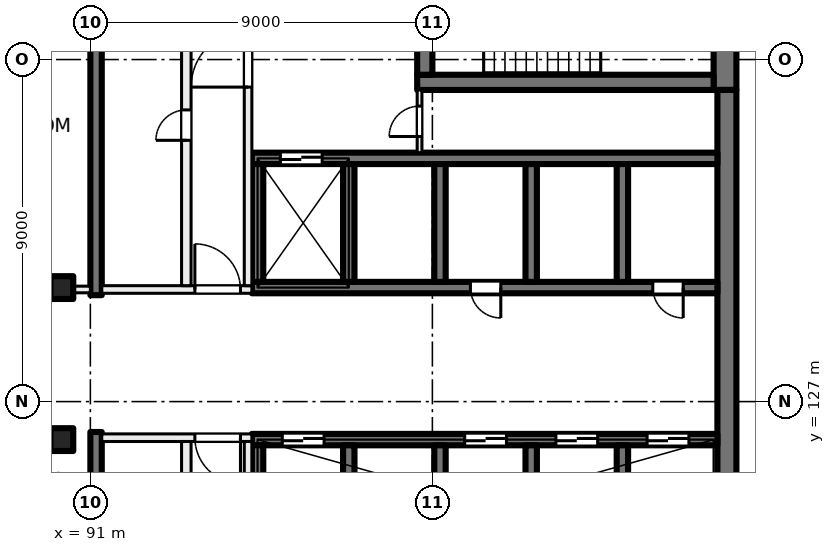
"""IFC4 building model, lengths in metres.
Left out: names, types, materials, properties, quantities, classifications, styles, units other than length and angle.
Written with IfcOpenShell. Run it as: python <this file> out.ifc"""

import sys

from ifc_helpers import new_model, si_unit, direction, frame, frame_2d, origin, origin_2d, place, context, subcontext, project, spatial, rectangle, extrude, element, fill, save


model = new_model("IFC4")
c1 = context("Model", 3, precision=1e-05, world=origin(), true_north=direction((0.0, 1.0)))
c2 = subcontext(c1, "Body", "Model", "MODEL_VIEW")
j1 = project(units=[si_unit("LENGTHUNIT", "METRE"), si_unit("PLANEANGLEUNIT", "RADIAN")], contexts=[c1])
p1 = place(None, origin())
s1 = spatial("IfcSite", under=j1, at=p1, CompositionType="ELEMENT")
p2 = place(p1, origin())
s2 = spatial("IfcBuilding", under=s1, at=p2, CompositionType="ELEMENT")
p3 = place(p2, frame((0.0, 0.0, 192.0)))
s3 = spatial("IfcBuildingStorey", under=s2, at=p3, CompositionType="ELEMENT", Elevation=192.0)
for number, where, z_axis, x_axis in (
    (1, (90.25, 130.0, 0.0), (0.0, 0.0, 1.0), (1.0, 0.0, 0.0)),
    (2, (90.25, 126.0, 0.0), (0.0, 0.0, 1.0), (1.0, 0.0, 0.0)),
):
    element("IfcColumn", number, at=place(p3, frame(where, z_axis=z_axis, x_axis=x_axis)), inside=s3, PredefinedType="COLUMN", context=c2, shape_type="SweptSolid", body=[
        extrude(rectangle(XDim=0.6, YDim=0.6, at=origin_2d()), origin(), (0.0, 0.0, 1.0), 4.0),
    ])
p4 = place(p3, frame((107.7, 139.0, 0.0), z_axis=(0.0, 0.0, 1.0), x_axis=(0.0, -1.0, 0.0)))
e3 = element("IfcWall", 3, at=p4, inside=s3, PredefinedType="SHEAR", context=c2, shape_type="SweptSolid", body=[
    extrude(rectangle(XDim=3.8, YDim=0.6, at=frame_2d((1.9, 0.0))), origin(), (0.0, 0.0, 1.0), 4.0),
])
p5 = place(p3, frame((107.75, 135.2, 0.0), z_axis=(0.0, 0.0, 1.0), x_axis=(0.0, -1.0, 0.0)))
e4 = element("IfcWall", 4, at=p5, inside=s3, PredefinedType="SHEAR", context=c2, shape_type="SweptSolid", body=[
    extrude(rectangle(XDim=14.4, YDim=0.5, at=frame_2d((7.2, 0.0))), origin(), (0.0, 0.0, 1.0), 4.0),
])
p6 = place(p3, frame((107.4, 135.4, 0.0), z_axis=(0.0, 0.0, 1.0), x_axis=(-1.0, 0.0, 0.0)))
e5 = element("IfcWall", 5, at=p6, inside=s3, PredefinedType="SHEAR", context=c2, shape_type="SweptSolid", body=[
    extrude(rectangle(XDim=7.8, YDim=0.4, at=frame_2d((3.9, 0.0))), origin(), (0.0, 0.0, 1.0), 4.0),
])
p7 = place(p3, frame((99.8, 138.4, 0.0), z_axis=(0.0, 0.0, 1.0), x_axis=(0.0, -1.0, 0.0)))
e6 = element("IfcWall", 6, at=p7, inside=s3, PredefinedType="SHEAR", context=c2, shape_type="SweptSolid", body=[
    extrude(rectangle(XDim=2.8, YDim=0.4, at=frame_2d((1.4, 0.0))), origin(), (0.0, 0.0, 1.0), 4.0),
])
p8 = place(p7, frame((0.85, 0.0, 0.0)))
e7 = element("IfcOpeningElement", 7, at=p8, cuts=e6, PredefinedType="OPENING", context=c2, shape_type="SweptSolid", body=[
    extrude(rectangle(XDim=1.0, YDim=2.1, at=frame_2d((0.5, 1.05))), frame((0.0, 0.21, 0.0), z_axis=(0.0, -1.0, 0.0), x_axis=(1.0, 0.0, 0.0)), (0.0, 0.0, 1.0), 0.42),
])
p9 = place(p3, frame((107.5, 130.0, 0.0), z_axis=(0.0, 0.0, 1.0), x_axis=(-1.0, 0.0, 0.0)))
e8 = element("IfcWall", 8, at=p9, inside=s3, PredefinedType="SHEAR", context=c2, shape_type="SweptSolid", body=[
    extrude(rectangle(XDim=12.25, YDim=0.3, at=frame_2d((6.125, 0.0))), origin(), (0.0, 0.0, 1.0), 4.0),
])
p10 = place(p9, frame((0.9, 0.0, 0.0)))
e9 = element("IfcOpeningElement", 9, at=p10, cuts=e8, PredefinedType="OPENING", context=c2, shape_type="SweptSolid", body=[
    extrude(rectangle(XDim=0.8, YDim=2.1, at=frame_2d((0.4, 1.05))), frame((0.0, 0.16, 0.0), z_axis=(0.0, -1.0, 0.0), x_axis=(1.0, 0.0, 0.0)), (0.0, 0.0, 1.0), 0.32),
])
p11 = place(p9, frame((5.7, 0.0, 0.0)))
e10 = element("IfcOpeningElement", 10, at=p11, cuts=e8, PredefinedType="OPENING", context=c2, shape_type="SweptSolid", body=[
    extrude(rectangle(XDim=0.8, YDim=2.1, at=frame_2d((0.4, 1.05))), frame((0.0, 0.16, 0.0), z_axis=(0.0, -1.0, 0.0), x_axis=(1.0, 0.0, 0.0)), (0.0, 0.0, 1.0), 0.32),
])
p12 = place(p3, frame((107.5, 133.4, 0.0), z_axis=(0.0, 0.0, 1.0), x_axis=(-1.0, 0.0, 0.0)))
e11 = element("IfcWall", 11, at=p12, inside=s3, PredefinedType="SHEAR", context=c2, shape_type="SweptSolid", body=[
    extrude(rectangle(XDim=12.25, YDim=0.3, at=frame_2d((6.125, 0.0))), origin(), (0.0, 0.0, 1.0), 4.0),
])
p13 = place(p12, frame((10.4, 0.0, 0.0)))
e12 = element("IfcOpeningElement", 12, at=p13, cuts=e11, PredefinedType="OPENING", context=c2, shape_type="SweptSolid", body=[
    extrude(rectangle(XDim=1.1, YDim=2.1, at=frame_2d((0.55, 1.05))), frame((0.0, 0.16, 0.0), z_axis=(0.0, -1.0, 0.0), x_axis=(1.0, 0.0, 0.0)), (0.0, 0.0, 1.0), 0.32),
])
for number, where, z_axis, x_axis in (
    (13, (105.0, 133.25, 0.0), (0.0, 0.0, 1.0), (0.0, -1.0, 0.0)),
    (14, (102.6, 133.25, 0.0), (0.0, 0.0, 1.0), (0.0, -1.0, 0.0)),
    (15, (100.2, 133.25, 0.0), (0.0, 0.0, 1.0), (0.0, -1.0, 0.0)),
    (16, (97.8, 133.25, 0.0), (0.0, 0.0, 1.0), (0.0, -1.0, 0.0)),
    (17, (95.4, 133.25, 0.0), (0.0, 0.0, 1.0), (0.0, -1.0, 0.0)),
):
    element("IfcWall", number, at=place(p3, frame(where, z_axis=z_axis, x_axis=x_axis)), inside=s3, PredefinedType="SHEAR", context=c2, shape_type="SweptSolid", body=[
        extrude(rectangle(XDim=3.1, YDim=0.3, at=frame_2d((1.55, 0.0))), origin(), (0.0, 0.0, 1.0), 4.0),
    ])
p14 = place(p3, frame((107.5, 126.0, 0.0), z_axis=(0.0, 0.0, 1.0), x_axis=(-1.0, 0.0, 0.0)))
e18 = element("IfcWall", 18, at=p14, inside=s3, PredefinedType="SHEAR", context=c2, shape_type="SweptSolid", body=[
    extrude(rectangle(XDim=12.25, YDim=0.3, at=frame_2d((6.125, 0.0))), origin(), (0.0, 0.0, 1.0), 4.0),
])
p15 = place(p14, frame((0.75, 0.0, 0.0)))
e19 = element("IfcOpeningElement", 19, at=p15, cuts=e18, PredefinedType="OPENING", context=c2, shape_type="SweptSolid", body=[
    extrude(rectangle(XDim=1.1, YDim=2.1, at=frame_2d((0.55, 1.05))), frame((0.0, 0.16, 0.0), z_axis=(0.0, -1.0, 0.0), x_axis=(1.0, 0.0, 0.0)), (0.0, 0.0, 1.0), 0.32),
])
p16 = place(p14, frame((3.15, 0.0, 0.0)))
e20 = element("IfcOpeningElement", 20, at=p16, cuts=e18, PredefinedType="OPENING", context=c2, shape_type="SweptSolid", body=[
    extrude(rectangle(XDim=1.1, YDim=2.1, at=frame_2d((0.55, 1.05))), frame((0.0, 0.16, 0.0), z_axis=(0.0, -1.0, 0.0), x_axis=(1.0, 0.0, 0.0)), (0.0, 0.0, 1.0), 0.32),
])
p17 = place(p14, frame((5.55, 0.0, 0.0)))
e21 = element("IfcOpeningElement", 21, at=p17, cuts=e18, PredefinedType="OPENING", context=c2, shape_type="SweptSolid", body=[
    extrude(rectangle(XDim=1.1, YDim=2.1, at=frame_2d((0.55, 1.05))), frame((0.0, 0.16, 0.0), z_axis=(0.0, -1.0, 0.0), x_axis=(1.0, 0.0, 0.0)), (0.0, 0.0, 1.0), 0.32),
])
p18 = place(p14, frame((10.35, 0.0, 0.0)))
e22 = element("IfcOpeningElement", 22, at=p18, cuts=e18, PredefinedType="OPENING", context=c2, shape_type="SweptSolid", body=[
    extrude(rectangle(XDim=1.1, YDim=2.1, at=frame_2d((0.55, 1.05))), frame((0.0, 0.16, 0.0), z_axis=(0.0, -1.0, 0.0), x_axis=(1.0, 0.0, 0.0)), (0.0, 0.0, 1.0), 0.32),
])
for number, where, z_axis, x_axis in (
    (23, (105.0, 125.85, 0.0), (0.0, 0.0, 1.0), (0.0, -1.0, 0.0)),
    (24, (102.6, 125.85, 0.0), (0.0, 0.0, 1.0), (0.0, -1.0, 0.0)),
    (25, (100.2, 125.85, 0.0), (0.0, 0.0, 1.0), (0.0, -1.0, 0.0)),
    (26, (97.8, 125.85, 0.0), (0.0, 0.0, 1.0), (0.0, -1.0, 0.0)),
    (27, (95.4, 125.85, 0.0), (0.0, 0.0, 1.0), (0.0, -1.0, 0.0)),
):
    element("IfcWall", number, at=place(p3, frame(where, z_axis=z_axis, x_axis=x_axis)), inside=s3, PredefinedType="SHEAR", context=c2, shape_type="SweptSolid", body=[
        extrude(rectangle(XDim=3.1, YDim=0.3, at=frame_2d((1.55, 0.0))), origin(), (0.0, 0.0, 1.0), 4.0),
    ])
for number, where, z_axis, x_axis in (
    (28, (91.15, 138.5, 0.0), (0.0, 0.0, 1.0), (0.0, -1.0, 0.0)),
    (29, (91.15, 126.2, 0.0), (0.0, 0.0, 1.0), (0.0, -1.0, 0.0)),
):
    element("IfcWall", number, at=place(p3, frame(where, z_axis=z_axis, x_axis=x_axis)), inside=s3, PredefinedType="SHEAR", context=c2, shape_type="SweptSolid", body=[
        extrude(rectangle(XDim=8.7, YDim=0.3, at=frame_2d((4.35, 0.0))), origin(), (0.0, 0.0, 1.0), 4.0),
    ])
p19 = place(p3, frame((95.25, 126.05, 0.0), z_axis=(0.0, 0.0, 1.0), x_axis=(-1.0, 0.0, 0.0)))
e30 = element("IfcWall", 30, at=p19, inside=s3, PredefinedType="PARTITIONING", context=c2, shape_type="SweptSolid", body=[
    extrude(rectangle(XDim=3.95, YDim=0.2, at=frame_2d((1.975, 0.0))), origin(), (0.0, 0.0, 1.0), 3.625),
])
p20 = place(p19, frame((0.3, 0.0, 0.0)))
e31 = element("IfcOpeningElement", 31, at=p20, cuts=e30, PredefinedType="OPENING", context=c2, shape_type="SweptSolid", body=[
    extrude(rectangle(XDim=1.2, YDim=2.1, at=frame_2d((0.6, 1.05))), frame((0.0, 0.11, 0.0), z_axis=(0.0, -1.0, 0.0), x_axis=(1.0, 0.0, 0.0)), (0.0, 0.0, 1.0), 0.22),
])
p21 = place(p3, frame((95.15, 117.5, 0.0), z_axis=(0.0, 0.0, 1.0), x_axis=(0.0, 1.0, 0.0)))
e32 = element("IfcWall", 32, at=p21, inside=s3, PredefinedType="PARTITIONING", context=c2, shape_type="SweptSolid", body=[
    extrude(rectangle(XDim=8.45, YDim=0.2, at=frame_2d((4.225, 0.0))), origin(), (0.0, 0.0, 1.0), 3.625),
])
p22 = place(p21, frame((1.725, 0.0, 0.0)))
e33 = element("IfcOpeningElement", 33, at=p22, cuts=e32, PredefinedType="OPENING", context=c2, shape_type="SweptSolid", body=[
    extrude(rectangle(XDim=1.5, YDim=2.1, at=frame_2d((0.75, 1.05))), frame((0.0, 0.11, 0.0), z_axis=(0.0, -1.0, 0.0), x_axis=(1.0, 0.0, 0.0)), (0.0, 0.0, 1.0), 0.22),
])
p23 = place(p3, frame((93.525, 117.5, 0.0), z_axis=(0.0, 0.0, 1.0), x_axis=(0.0, 1.0, 0.0)))
e34 = element("IfcWall", 34, at=p23, inside=s3, PredefinedType="PARTITIONING", context=c2, shape_type="SweptSolid", body=[
    extrude(rectangle(XDim=8.45, YDim=0.25, at=frame_2d((4.225, 0.0))), origin(), (0.0, 0.0, 1.0), 3.625),
])
p24 = place(p23, frame((5.26, 0.0, 0.0)))
e35 = element("IfcOpeningElement", 35, at=p24, cuts=e34, PredefinedType="OPENING", context=c2, shape_type="SweptSolid", body=[
    extrude(rectangle(XDim=0.8, YDim=2.1, at=frame_2d((0.4, 1.05))), frame((0.0, 0.135, 0.0), z_axis=(0.0, -1.0, 0.0), x_axis=(1.0, 0.0, 0.0)), (0.0, 0.0, 1.0), 0.27),
])
p25 = place(p23, frame((0.985, 0.0, 0.0)))
e36 = element("IfcOpeningElement", 36, at=p25, cuts=e34, PredefinedType="OPENING", context=c2, shape_type="SweptSolid", body=[
    extrude(rectangle(XDim=0.8, YDim=2.1, at=frame_2d((0.4, 1.05))), frame((0.0, 0.135, 0.0), z_axis=(0.0, -1.0, 0.0), x_axis=(1.0, 0.0, 0.0)), (0.0, 0.0, 1.0), 0.27),
])
p26 = place(p3, frame((91.3, 129.95, 0.0), z_axis=(0.0, 0.0, 1.0), x_axis=(1.0, 0.0, 0.0)))
e37 = element("IfcWall", 37, at=p26, inside=s3, PredefinedType="PARTITIONING", context=c2, shape_type="SweptSolid", body=[
    extrude(rectangle(XDim=3.95, YDim=0.2, at=frame_2d((1.975, 0.0))), origin(), (0.0, 0.0, 1.0), 3.625),
])
p27 = place(p26, frame((2.45, 0.0, 0.0)))
e38 = element("IfcOpeningElement", 38, at=p27, cuts=e37, PredefinedType="OPENING", context=c2, shape_type="SweptSolid", body=[
    extrude(rectangle(XDim=1.2, YDim=2.1, at=frame_2d((0.6, 1.05))), frame((0.0, 0.11, 0.0), z_axis=(0.0, -1.0, 0.0), x_axis=(1.0, 0.0, 0.0)), (0.0, 0.0, 1.0), 0.22),
])
p28 = place(p3, frame((95.15, 130.05, 0.0), z_axis=(0.0, 0.0, 1.0), x_axis=(0.0, 1.0, 0.0)))
e39 = element("IfcWall", 39, at=p28, inside=s3, PredefinedType="PARTITIONING", context=c2, shape_type="SweptSolid", body=[
    extrude(rectangle(XDim=8.45, YDim=0.2, at=frame_2d((4.225, 0.0))), origin(), (0.0, 0.0, 1.0), 3.625),
])
p29 = place(p28, frame((5.225, 0.0, 0.0)))
e40 = element("IfcOpeningElement", 40, at=p29, cuts=e39, PredefinedType="OPENING", context=c2, shape_type="SweptSolid", body=[
    extrude(rectangle(XDim=1.5, YDim=2.1, at=frame_2d((0.75, 1.05))), frame((0.0, 0.11, 0.0), z_axis=(0.0, -1.0, 0.0), x_axis=(1.0, 0.0, 0.0)), (0.0, 0.0, 1.0), 0.22),
])
p30 = place(p3, frame((93.525, 130.05, 0.0), z_axis=(0.0, 0.0, 1.0), x_axis=(0.0, 1.0, 0.0)))
e41 = element("IfcWall", 41, at=p30, inside=s3, PredefinedType="PARTITIONING", context=c2, shape_type="SweptSolid", body=[
    extrude(rectangle(XDim=8.45, YDim=0.25, at=frame_2d((4.225, 0.0))), origin(), (0.0, 0.0, 1.0), 3.625),
])
p31 = place(p30, frame((3.825, 0.0, 0.0)))
e42 = element("IfcOpeningElement", 42, at=p31, cuts=e41, PredefinedType="OPENING", context=c2, shape_type="SweptSolid", body=[
    extrude(rectangle(XDim=0.8, YDim=2.1, at=frame_2d((0.4, 1.05))), frame((0.0, 0.135, 0.0), z_axis=(0.0, -1.0, 0.0), x_axis=(1.0, 0.0, 0.0)), (0.0, 0.0, 1.0), 0.27),
])
p32 = place(p3, frame((99.663, 133.55, 0.0), z_axis=(0.0, 0.0, 1.0), x_axis=(0.0, 1.0, 0.0)))
e43 = element("IfcWall", 43, at=p32, inside=s3, PredefinedType="PARTITIONING", context=c2, shape_type="SweptSolid", body=[
    extrude(rectangle(XDim=1.65, YDim=0.125, at=frame_2d((0.825, 0.0))), origin(), (0.0, 0.0, 1.0), 3.625),
])
p33 = place(p32, frame((0.425, 0.0, 0.0)))
e44 = element("IfcOpeningElement", 44, at=p33, cuts=e43, PredefinedType="OPENING", context=c2, shape_type="SweptSolid", body=[
    extrude(rectangle(XDim=0.8, YDim=2.1, at=frame_2d((0.4, 1.05))), frame((0.0, 0.073, 0.0), z_axis=(0.0, -1.0, 0.0), x_axis=(1.0, 0.0, 0.0)), (0.0, 0.0, 1.0), 0.145),
])
p34 = place(p3, frame((85.838, 129.95, 0.0), z_axis=(0.0, 0.0, 1.0), x_axis=(1.0, 0.0, 0.0)))
e45 = element("IfcWall", 45, at=p34, inside=s3, PredefinedType="PARTITIONING", context=c2, shape_type="SweptSolid", body=[
    extrude(rectangle(XDim=5.162, YDim=0.175, at=frame_2d((2.581, 0.0))), origin(), (0.0, 0.0, 1.0), 3.625),
])
p35 = place(p34, frame((1.971, 0.0, 0.0)))
e46 = element("IfcOpeningElement", 46, at=p35, cuts=e45, PredefinedType="OPENING", context=c2, shape_type="SweptSolid", body=[
    extrude(rectangle(XDim=1.2, YDim=2.1, at=frame_2d((0.6, 1.05))), frame((0.0, 0.097, 0.0), z_axis=(0.0, -1.0, 0.0), x_axis=(1.0, 0.0, 0.0)), (0.0, 0.0, 1.0), 0.195),
])
p36 = place(p15, origin())
e47 = element("IfcDoor", 47, at=p36, inside=s3, OperationType="DOUBLE_DOOR_SLIDING", PredefinedType="DOOR", context=c2, shape_type="SweptSolid", body=[
    extrude(rectangle(XDim=1.1, YDim=2.1, at=frame_2d((0.55, 1.05))), frame((0.0, 0.025, 0.0), z_axis=(0.0, -1.0, 0.0), x_axis=(1.0, 0.0, 0.0)), (0.0, 0.0, 1.0), 0.05),
])
fill(e19, e47)
p37 = place(p16, origin())
e48 = element("IfcDoor", 48, at=p37, inside=s3, OperationType="DOUBLE_DOOR_SLIDING", PredefinedType="DOOR", context=c2, shape_type="SweptSolid", body=[
    extrude(rectangle(XDim=1.1, YDim=2.1, at=frame_2d((0.55, 1.05))), frame((0.0, 0.025, 0.0), z_axis=(0.0, -1.0, 0.0), x_axis=(1.0, 0.0, 0.0)), (0.0, 0.0, 1.0), 0.05),
])
fill(e20, e48)
p38 = place(p17, origin())
e49 = element("IfcDoor", 49, at=p38, inside=s3, OperationType="DOUBLE_DOOR_SLIDING", PredefinedType="DOOR", context=c2, shape_type="SweptSolid", body=[
    extrude(rectangle(XDim=1.1, YDim=2.1, at=frame_2d((0.55, 1.05))), frame((0.0, 0.025, 0.0), z_axis=(0.0, -1.0, 0.0), x_axis=(1.0, 0.0, 0.0)), (0.0, 0.0, 1.0), 0.05),
])
fill(e21, e49)
p39 = place(p18, origin())
e50 = element("IfcDoor", 50, at=p39, inside=s3, OperationType="DOUBLE_DOOR_SLIDING", PredefinedType="DOOR", context=c2, shape_type="SweptSolid", body=[
    extrude(rectangle(XDim=1.1, YDim=2.1, at=frame_2d((0.55, 1.05))), frame((0.0, 0.025, 0.0), z_axis=(0.0, -1.0, 0.0), x_axis=(1.0, 0.0, 0.0)), (0.0, 0.0, 1.0), 0.05),
])
fill(e22, e50)
p40 = place(p10, origin())
e51 = element("IfcDoor", 51, at=p40, inside=s3, OperationType="SINGLE_SWING_LEFT", PredefinedType="DOOR", context=c2, shape_type="SweptSolid", body=[
    extrude(rectangle(XDim=0.8, YDim=2.1, at=frame_2d((0.4, 1.05))), frame((0.0, 0.025, 0.0), z_axis=(0.0, -1.0, 0.0), x_axis=(1.0, 0.0, 0.0)), (0.0, 0.0, 1.0), 0.05),
])
fill(e9, e51)
p41 = place(p11, origin())
e52 = element("IfcDoor", 52, at=p41, inside=s3, OperationType="SINGLE_SWING_RIGHT", PredefinedType="DOOR", context=c2, shape_type="SweptSolid", body=[
    extrude(rectangle(XDim=0.8, YDim=2.1, at=frame_2d((0.4, 1.05))), frame((0.0, 0.025, 0.0), z_axis=(0.0, -1.0, 0.0), x_axis=(1.0, 0.0, 0.0)), (0.0, 0.0, 1.0), 0.05),
])
fill(e10, e52)
p42 = place(p20, origin())
e53 = element("IfcDoor", 53, at=p42, inside=s3, OperationType="DOUBLE_DOOR_SINGLE_SWING", PredefinedType="DOOR", context=c2, shape_type="SweptSolid", body=[
    extrude(rectangle(XDim=1.2, YDim=2.1, at=frame_2d((0.6, 1.05))), frame((0.0, 0.025, 0.0), z_axis=(0.0, -1.0, 0.0), x_axis=(1.0, 0.0, 0.0)), (0.0, 0.0, 1.0), 0.05),
])
fill(e31, e53)
p43 = place(p27, origin())
e54 = element("IfcDoor", 54, at=p43, inside=s3, OperationType="DOUBLE_DOOR_SINGLE_SWING", PredefinedType="DOOR", context=c2, shape_type="SweptSolid", body=[
    extrude(rectangle(XDim=1.2, YDim=2.1, at=frame_2d((0.6, 1.05))), frame((0.0, 0.025, 0.0), z_axis=(0.0, -1.0, 0.0), x_axis=(1.0, 0.0, 0.0)), (0.0, 0.0, 1.0), 0.05),
])
fill(e38, e54)
p44 = place(p29, origin())
e55 = element("IfcDoor", 55, at=p44, inside=s3, OperationType="DOUBLE_DOOR_SINGLE_SWING", PredefinedType="DOOR", context=c2, shape_type="SweptSolid", body=[
    extrude(rectangle(XDim=1.5, YDim=2.1, at=frame_2d((0.75, 1.05))), frame((0.0, 0.025, 0.0), z_axis=(0.0, -1.0, 0.0), x_axis=(1.0, 0.0, 0.0)), (0.0, 0.0, 1.0), 0.05),
])
fill(e40, e55)
p45 = place(p33, origin())
e56 = element("IfcDoor", 56, at=p45, inside=s3, OperationType="SINGLE_SWING_LEFT", PredefinedType="DOOR", context=c2, shape_type="SweptSolid", body=[
    extrude(rectangle(XDim=0.8, YDim=2.1, at=frame_2d((0.4, 1.05))), frame((0.0, 0.025, 0.0), z_axis=(0.0, -1.0, 0.0), x_axis=(1.0, 0.0, 0.0)), (0.0, 0.0, 1.0), 0.05),
])
fill(e44, e56)
p46 = place(p31, origin())
e57 = element("IfcDoor", 57, at=p46, inside=s3, OperationType="SINGLE_SWING_RIGHT", PredefinedType="DOOR", context=c2, shape_type="SweptSolid", body=[
    extrude(rectangle(XDim=0.8, YDim=2.1, at=frame_2d((0.4, 1.05))), frame((0.0, 0.025, 0.0), z_axis=(0.0, -1.0, 0.0), x_axis=(1.0, 0.0, 0.0)), (0.0, 0.0, 1.0), 0.05),
])
fill(e42, e57)
p47 = place(p13, origin())
e58 = element("IfcDoor", 58, at=p47, inside=s3, OperationType="DOUBLE_DOOR_SLIDING", PredefinedType="DOOR", context=c2, shape_type="SweptSolid", body=[
    extrude(rectangle(XDim=1.1, YDim=2.1, at=frame_2d((0.55, 1.05))), frame((0.0, 0.025, 0.0), z_axis=(0.0, -1.0, 0.0), x_axis=(1.0, 0.0, 0.0)), (0.0, 0.0, 1.0), 0.05),
])
fill(e12, e58)
save(model, sys.argv[1])
